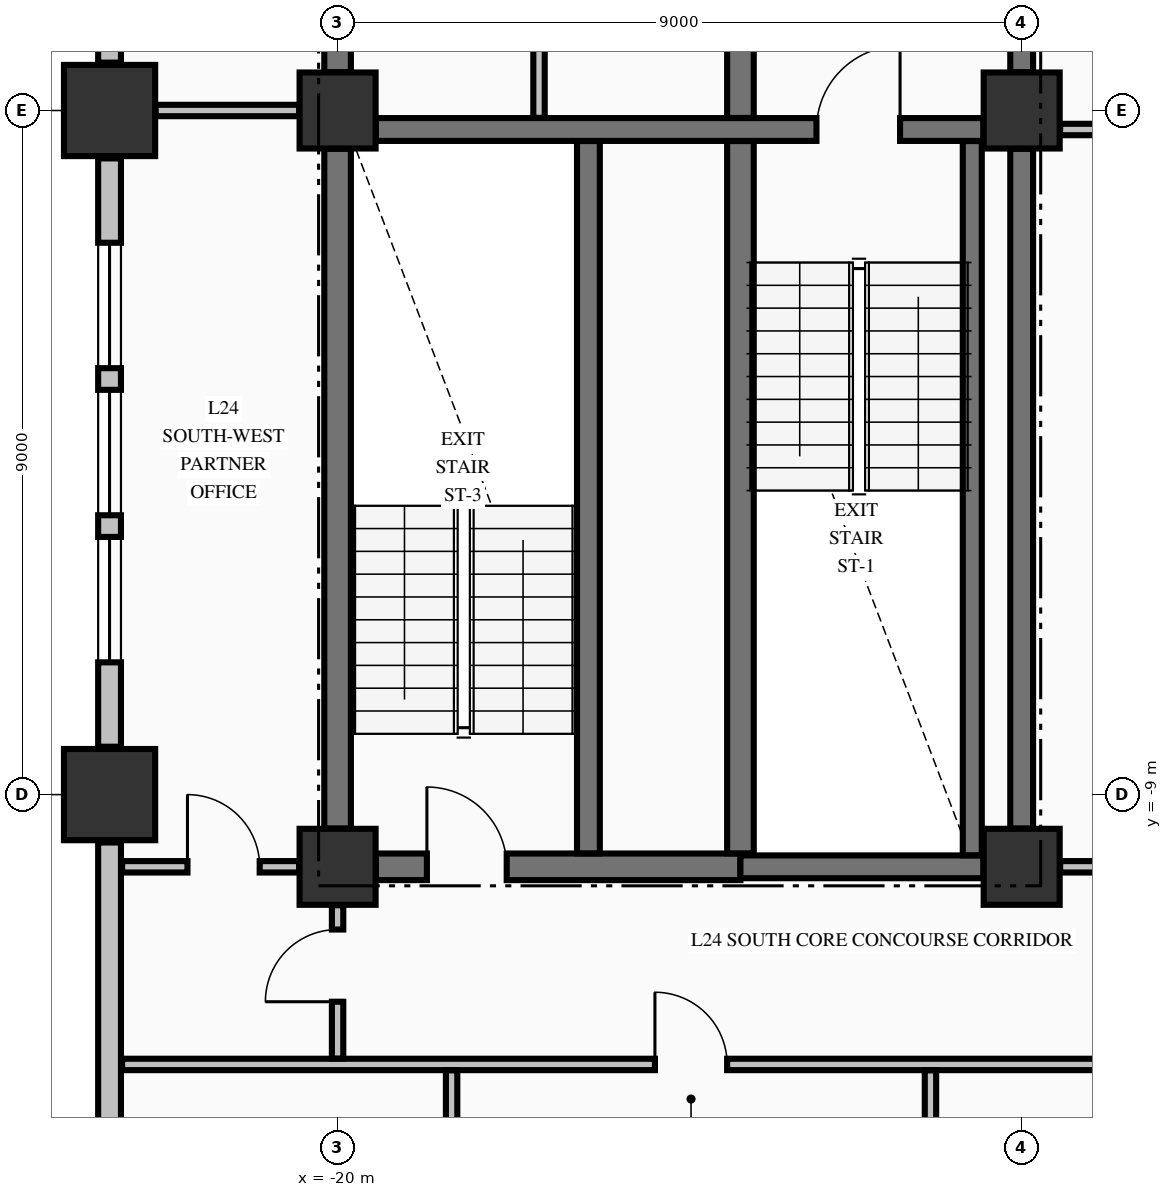
"""IFC4 building model, lengths in metres.
Left out: names, types, materials, properties, quantities, classifications, styles, units other than length and angle.
Written with IfcOpenShell. Run it as: python <this file> out.ifc"""

import sys

from ifc_helpers import new_model, si_unit, direction, frame, frame_2d, origin, origin_2d, place, context, subcontext, project, spatial, rectangle, extrude, element, fill, save


model = new_model("IFC4")
c1 = context("Model", 3, precision=1e-05, world=origin(), true_north=direction((0.0, 1.0)))
c2 = subcontext(c1, "Body", "Model", "MODEL_VIEW")
j1 = project(units=[si_unit("LENGTHUNIT", "METRE"), si_unit("PLANEANGLEUNIT", "RADIAN")], contexts=[c1])
p1 = place(None, origin())
s1 = spatial("IfcSite", under=j1, at=p1, CompositionType="ELEMENT")
p2 = place(p1, origin())
s2 = spatial("IfcBuilding", under=s1, at=p2, CompositionType="ELEMENT")
p3 = place(p2, frame((0.0, 0.0, 98.5)))
s3 = spatial("IfcBuildingStorey", under=s2, at=p3, CompositionType="ELEMENT", Elevation=98.5)
for number, where, z_axis, x_axis in (
    (1, (-23.0, -9.0, -0.275), (0.0, 0.0, 1.0), (1.0, 0.0, 0.0)),
    (2, (-23.0, 0.0, -0.275), (0.0, 0.0, 1.0), (1.0, 0.0, 0.0)),
):
    element("IfcColumn", number, at=place(p3, frame(where, z_axis=z_axis, x_axis=x_axis)), inside=s3, PredefinedType="COLUMN", context=c2, shape_type="SweptSolid", body=[
        extrude(rectangle(XDim=1.2, YDim=1.2, at=origin_2d()), origin(), (0.0, 0.0, 1.0), 3.595),
    ])
for number, where, z_axis, x_axis in (
    (3, (-20.0, -9.95, -0.275), (0.0, 0.0, 1.0), (1.0, 0.0, 0.0)),
    (4, (-11.0, -9.95, -0.275), (0.0, 0.0, 1.0), (1.0, 0.0, 0.0)),
    (5, (-11.0, 0.0, -0.275), (0.0, 0.0, 1.0), (1.0, 0.0, 0.0)),
    (6, (-20.0, 0.0, -0.275), (0.0, 0.0, 1.0), (1.0, 0.0, 0.0)),
):
    element("IfcColumn", number, at=place(p3, frame(where, z_axis=z_axis, x_axis=x_axis)), inside=s3, PredefinedType="COLUMN", context=c2, shape_type="SweptSolid", body=[
        extrude(rectangle(XDim=1.0, YDim=1.0, at=origin_2d()), origin(), (0.0, 0.0, 1.0), 3.595),
    ])
p4 = place(p3, frame((-23.0, -9.63, 0.0), z_axis=(0.0, 0.0, 1.0), x_axis=(0.0, -1.0, 0.0)))
e7 = element("IfcWall", 7, at=p4, inside=s3, PredefinedType="STANDARD", context=c2, shape_type="SweptSolid", body=[
    extrude(rectangle(XDim=10.74, YDim=0.3, at=frame_2d((5.37, 0.0))), origin(), (0.0, 0.0, 1.0), 2.712),
])
p5 = place(p3, frame((-23.0, -0.63, 0.0), z_axis=(0.0, 0.0, 1.0), x_axis=(0.0, -1.0, 0.0)))
e8 = element("IfcWall", 8, at=p5, inside=s3, PredefinedType="STANDARD", context=c2, shape_type="SweptSolid", body=[
    extrude(rectangle(XDim=7.74, YDim=0.3, at=frame_2d((3.87, 0.0))), origin(), (0.0, 0.0, 1.0), 2.712),
])
p6 = place(p5, frame((1.11, 0.0, 0.8)))
e9 = element("IfcOpeningElement", 9, at=p6, cuts=e8, PredefinedType="OPENING", context=c2, shape_type="SweptSolid", body=[
    extrude(rectangle(XDim=1.65, YDim=1.7, at=frame_2d((0.825, 0.85))), frame((0.0, 0.16, 0.0), z_axis=(0.0, -1.0, 0.0), x_axis=(1.0, 0.0, 0.0)), (0.0, 0.0, 1.0), 0.32),
])
p7 = place(p5, frame((3.045, 0.0, 0.8)))
e10 = element("IfcOpeningElement", 10, at=p7, cuts=e8, PredefinedType="OPENING", context=c2, shape_type="SweptSolid", body=[
    extrude(rectangle(XDim=1.65, YDim=1.7, at=frame_2d((0.825, 0.85))), frame((0.0, 0.16, 0.0), z_axis=(0.0, -1.0, 0.0), x_axis=(1.0, 0.0, 0.0)), (0.0, 0.0, 1.0), 0.32),
])
p8 = place(p5, frame((4.98, 0.0, 0.8)))
e11 = element("IfcOpeningElement", 11, at=p8, cuts=e8, PredefinedType="OPENING", context=c2, shape_type="SweptSolid", body=[
    extrude(rectangle(XDim=1.65, YDim=1.7, at=frame_2d((0.825, 0.85))), frame((0.0, 0.16, 0.0), z_axis=(0.0, -1.0, 0.0), x_axis=(1.0, 0.0, 0.0)), (0.0, 0.0, 1.0), 0.32),
])
p9 = place(p3, frame((-23.0, 8.37, 0.0), z_axis=(0.0, 0.0, 1.0), x_axis=(0.0, -1.0, 0.0)))
e12 = element("IfcWall", 12, at=p9, inside=s3, PredefinedType="STANDARD", context=c2, shape_type="SweptSolid", body=[
    extrude(rectangle(XDim=7.74, YDim=0.3, at=frame_2d((3.87, 0.0))), origin(), (0.0, 0.0, 1.0), 2.712),
])
p10 = place(p9, frame((1.11, 0.0, 0.8)))
e13 = element("IfcOpeningElement", 13, at=p10, cuts=e12, PredefinedType="OPENING", context=c2, shape_type="SweptSolid", body=[
    extrude(rectangle(XDim=1.65, YDim=1.7, at=frame_2d((0.825, 0.85))), frame((0.0, 0.16, 0.0), z_axis=(0.0, -1.0, 0.0), x_axis=(1.0, 0.0, 0.0)), (0.0, 0.0, 1.0), 0.32),
])
p11 = place(p9, frame((3.045, 0.0, 0.8)))
e14 = element("IfcOpeningElement", 14, at=p11, cuts=e12, PredefinedType="OPENING", context=c2, shape_type="SweptSolid", body=[
    extrude(rectangle(XDim=1.65, YDim=1.7, at=frame_2d((0.825, 0.85))), frame((0.0, 0.16, 0.0), z_axis=(0.0, -1.0, 0.0), x_axis=(1.0, 0.0, 0.0)), (0.0, 0.0, 1.0), 0.32),
])
p12 = place(p9, frame((4.98, 0.0, 0.8)))
e15 = element("IfcOpeningElement", 15, at=p12, cuts=e12, PredefinedType="OPENING", context=c2, shape_type="SweptSolid", body=[
    extrude(rectangle(XDim=1.65, YDim=1.7, at=frame_2d((0.825, 0.85))), frame((0.0, 0.16, 0.0), z_axis=(0.0, -1.0, 0.0), x_axis=(1.0, 0.0, 0.0)), (0.0, 0.0, 1.0), 0.32),
])
p13 = place(p3, frame((-19.496, -9.95, 0.0), z_axis=(0.0, 0.0, 1.0), x_axis=(1.0, 0.0, 0.0)))
e16 = element("IfcWall", 16, at=p13, inside=s3, PredefinedType="SHEAR", context=c2, shape_type="SweptSolid", body=[
    extrude(rectangle(XDim=4.796, YDim=0.35, at=frame_2d((2.398, 0.0))), origin(), (0.0, 0.0, 1.0), 3.32),
])
p14 = place(p13, frame((0.671, 0.0, 0.0)))
e17 = element("IfcOpeningElement", 17, at=p14, cuts=e16, PredefinedType="OPENING", context=c2, shape_type="SweptSolid", body=[
    extrude(rectangle(XDim=1.05, YDim=2.15, at=frame_2d((0.525, 1.075))), frame((0.0, 0.185, 0.0), z_axis=(0.0, -1.0, 0.0), x_axis=(1.0, 0.0, 0.0)), (0.0, 0.0, 1.0), 0.37),
])
p15 = place(p3, frame((-14.7, -9.95, 0.0), z_axis=(0.0, 0.0, 1.0), x_axis=(1.0, 0.0, 0.0)))
e18 = element("IfcWall", 18, at=p15, inside=s3, PredefinedType="SHEAR", context=c2, shape_type="SweptSolid", body=[
    extrude(rectangle(XDim=3.196, YDim=0.3, at=frame_2d((1.598, 0.0))), origin(), (0.0, 0.0, 1.0), 3.32),
])
p16 = place(p3, frame((-19.496, -0.25, 0.0), z_axis=(0.0, 0.0, 1.0), x_axis=(1.0, 0.0, 0.0)))
e19 = element("IfcWall", 19, at=p16, inside=s3, PredefinedType="SHEAR", context=c2, shape_type="SweptSolid", body=[
    extrude(rectangle(XDim=7.992, YDim=0.3, at=frame_2d((3.996, 0.0))), origin(), (0.0, 0.0, 1.0), 3.32),
])
p17 = place(p16, frame((5.796, 0.0, 0.0)))
e20 = element("IfcOpeningElement", 20, at=p17, cuts=e19, PredefinedType="OPENING", context=c2, shape_type="SweptSolid", body=[
    extrude(rectangle(XDim=1.1, YDim=2.15, at=frame_2d((0.55, 1.075))), frame((0.0, 0.16, 0.0), z_axis=(0.0, -1.0, 0.0), x_axis=(1.0, 0.0, 0.0)), (0.0, 0.0, 1.0), 0.32),
])
p18 = place(p3, frame((-22.835, -12.55, 0.0), z_axis=(0.0, 0.0, 1.0), x_axis=(1.0, 0.0, 0.0)))
e21 = element("IfcWall", 21, at=p18, inside=s3, PredefinedType="PARTITIONING", context=c2, shape_type="SweptSolid", body=[
    extrude(rectangle(XDim=50.67, YDim=0.15, at=frame_2d((25.335, 0.0))), origin(), (0.0, 0.0, 1.0), 3.32),
])
p19 = place(p18, frame((7.01, 0.0, 0.0)))
e22 = element("IfcOpeningElement", 22, at=p19, cuts=e21, PredefinedType="OPENING", context=c2, shape_type="SweptSolid", body=[
    extrude(rectangle(XDim=0.95, YDim=2.15, at=frame_2d((0.475, 1.075))), frame((0.0, 0.085, 0.0), z_axis=(0.0, -1.0, 0.0), x_axis=(1.0, 0.0, 0.0)), (0.0, 0.0, 1.0), 0.17),
])
p20 = place(p18, frame((14.91, 0.0, 0.0)))
e23 = element("IfcOpeningElement", 23, at=p20, cuts=e21, PredefinedType="OPENING", context=c2, shape_type="SweptSolid", body=[
    extrude(rectangle(XDim=1.05, YDim=2.15, at=frame_2d((0.525, 1.075))), frame((0.0, 0.085, 0.0), z_axis=(0.0, -1.0, 0.0), x_axis=(1.0, 0.0, 0.0)), (0.0, 0.0, 1.0), 0.17),
])
p21 = place(p18, frame((24.71, 0.0, 0.0)))
e24 = element("IfcOpeningElement", 24, at=p21, cuts=e21, PredefinedType="OPENING", context=c2, shape_type="SweptSolid", body=[
    extrude(rectangle(XDim=1.05, YDim=2.15, at=frame_2d((0.525, 1.075))), frame((0.0, 0.085, 0.0), z_axis=(0.0, -1.0, 0.0), x_axis=(1.0, 0.0, 0.0)), (0.0, 0.0, 1.0), 0.17),
])
p22 = place(p18, frame((35.91, 0.0, 0.0)))
e25 = element("IfcOpeningElement", 25, at=p22, cuts=e21, PredefinedType="OPENING", context=c2, shape_type="SweptSolid", body=[
    extrude(rectangle(XDim=1.05, YDim=2.15, at=frame_2d((0.525, 1.075))), frame((0.0, 0.085, 0.0), z_axis=(0.0, -1.0, 0.0), x_axis=(1.0, 0.0, 0.0)), (0.0, 0.0, 1.0), 0.17),
])
p23 = place(p3, frame((-22.835, -9.95, 0.0), z_axis=(0.0, 0.0, 1.0), x_axis=(1.0, 0.0, 0.0)))
e26 = element("IfcWall", 26, at=p23, inside=s3, PredefinedType="PARTITIONING", context=c2, shape_type="SweptSolid", body=[
    extrude(rectangle(XDim=2.329, YDim=0.15, at=frame_2d((1.165, 0.0))), origin(), (0.0, 0.0, 1.0), 3.32),
])
p24 = place(p23, frame((0.86, 0.0, 0.0)))
e27 = element("IfcOpeningElement", 27, at=p24, cuts=e26, PredefinedType="OPENING", context=c2, shape_type="SweptSolid", body=[
    extrude(rectangle(XDim=0.95, YDim=2.15, at=frame_2d((0.475, 1.075))), frame((0.0, 0.085, 0.0), z_axis=(0.0, -1.0, 0.0), x_axis=(1.0, 0.0, 0.0)), (0.0, 0.0, 1.0), 0.17),
])
p25 = place(p3, frame((-10.494, -9.95, 0.0), z_axis=(0.0, 0.0, 1.0), x_axis=(1.0, 0.0, 0.0)))
e28 = element("IfcWall", 28, at=p25, inside=s3, PredefinedType="PARTITIONING", context=c2, shape_type="SweptSolid", body=[
    extrude(rectangle(XDim=20.988, YDim=0.15, at=frame_2d((10.494, 0.0))), origin(), (0.0, 0.0, 1.0), 3.32),
])
p26 = place(p25, frame((8.194, 0.0, 0.0)))
e29 = element("IfcOpeningElement", 29, at=p26, cuts=e28, PredefinedType="OPENING", context=c2, shape_type="SweptSolid", body=[
    extrude(rectangle(XDim=1.1, YDim=2.15, at=frame_2d((0.55, 1.075))), frame((0.0, 0.085, 0.0), z_axis=(0.0, -1.0, 0.0), x_axis=(1.0, 0.0, 0.0)), (0.0, 0.0, 1.0), 0.17),
])
p27 = place(p25, frame((13.619, 0.0, 0.0)))
e30 = element("IfcOpeningElement", 30, at=p27, cuts=e28, PredefinedType="OPENING", context=c2, shape_type="SweptSolid", body=[
    extrude(rectangle(XDim=0.95, YDim=2.15, at=frame_2d((0.475, 1.075))), frame((0.0, 0.085, 0.0), z_axis=(0.0, -1.0, 0.0), x_axis=(1.0, 0.0, 0.0)), (0.0, 0.0, 1.0), 0.17),
])
p28 = place(p25, frame((17.844, 0.0, 0.0)))
e31 = element("IfcOpeningElement", 31, at=p28, cuts=e28, PredefinedType="OPENING", context=c2, shape_type="SweptSolid", body=[
    extrude(rectangle(XDim=0.9, YDim=2.15, at=frame_2d((0.45, 1.075))), frame((0.0, 0.085, 0.0), z_axis=(0.0, -1.0, 0.0), x_axis=(1.0, 0.0, 0.0)), (0.0, 0.0, 1.0), 0.17),
])
p29 = place(p3, frame((-10.494, -0.25, 0.0), z_axis=(0.0, 0.0, 1.0), x_axis=(1.0, 0.0, 0.0)))
e32 = element("IfcWall", 32, at=p29, inside=s3, PredefinedType="PARTITIONING", context=c2, shape_type="SweptSolid", body=[
    extrude(rectangle(XDim=20.988, YDim=0.15, at=frame_2d((10.494, 0.0))), origin(), (0.0, 0.0, 1.0), 3.32),
])
p30 = place(p29, frame((8.194, 0.0, 0.0)))
e33 = element("IfcOpeningElement", 33, at=p30, cuts=e32, PredefinedType="OPENING", context=c2, shape_type="SweptSolid", body=[
    extrude(rectangle(XDim=1.1, YDim=2.15, at=frame_2d((0.55, 1.075))), frame((0.0, 0.085, 0.0), z_axis=(0.0, -1.0, 0.0), x_axis=(1.0, 0.0, 0.0)), (0.0, 0.0, 1.0), 0.17),
])
p31 = place(p29, frame((3.049, 0.0, 0.0)))
e34 = element("IfcOpeningElement", 34, at=p31, cuts=e32, PredefinedType="OPENING", context=c2, shape_type="SweptSolid", body=[
    extrude(rectangle(XDim=1.05, YDim=2.15, at=frame_2d((0.525, 1.075))), frame((0.0, 0.085, 0.0), z_axis=(0.0, -1.0, 0.0), x_axis=(1.0, 0.0, 0.0)), (0.0, 0.0, 1.0), 0.17),
])
p32 = place(p29, frame((15.189, 0.0, 0.0)))
e35 = element("IfcOpeningElement", 35, at=p32, cuts=e32, PredefinedType="OPENING", context=c2, shape_type="SweptSolid", body=[
    extrude(rectangle(XDim=0.95, YDim=2.15, at=frame_2d((0.475, 1.075))), frame((0.0, 0.085, 0.0), z_axis=(0.0, -1.0, 0.0), x_axis=(1.0, 0.0, 0.0)), (0.0, 0.0, 1.0), 0.17),
])
p33 = place(p3, frame((-22.394, 0.0, 0.0), z_axis=(0.0, 0.0, 1.0), x_axis=(1.0, 0.0, 0.0)))
e36 = element("IfcWall", 36, at=p33, inside=s3, PredefinedType="PARTITIONING", context=c2, shape_type="SweptSolid", body=[
    extrude(rectangle(XDim=1.888, YDim=0.15, at=frame_2d((0.944, 0.0))), origin(), (0.0, 0.0, 1.0), 2.81),
])
p34 = place(p3, frame((-20.0, -9.446, 0.0), z_axis=(0.0, 0.0, 1.0), x_axis=(0.0, 1.0, 0.0)))
e37 = element("IfcWall", 37, at=p34, inside=s3, PredefinedType="SHEAR", context=c2, shape_type="SweptSolid", body=[
    extrude(rectangle(XDim=8.942, YDim=0.35, at=frame_2d((4.471, 0.0))), origin(), (0.0, 0.0, 1.0), 3.32),
])
p35 = place(p3, frame((-20.0, 0.504, 0.0), z_axis=(0.0, 0.0, 1.0), x_axis=(0.0, 1.0, 0.0)))
e38 = element("IfcWall", 38, at=p35, inside=s3, PredefinedType="SHEAR", context=c2, shape_type="SweptSolid", body=[
    extrude(rectangle(XDim=9.492, YDim=0.35, at=frame_2d((4.746, 0.0))), origin(), (0.0, 0.0, 1.0), 3.32),
])
p36 = place(p3, frame((-16.7, -9.773, 0.0), z_axis=(0.0, 0.0, 1.0), x_axis=(0.0, 1.0, 0.0)))
e39 = element("IfcWall", 39, at=p36, inside=s3, PredefinedType="SHEAR", context=c2, shape_type="SweptSolid", body=[
    extrude(rectangle(XDim=9.371, YDim=0.3, at=frame_2d((4.686, 0.0))), origin(), (0.0, 0.0, 1.0), 3.32),
])
p37 = place(p3, frame((-14.7, -9.773, 0.0), z_axis=(0.0, 0.0, 1.0), x_axis=(0.0, 1.0, 0.0)))
e40 = element("IfcWall", 40, at=p37, inside=s3, PredefinedType="SHEAR", context=c2, shape_type="SweptSolid", body=[
    extrude(rectangle(XDim=9.371, YDim=0.35, at=frame_2d((4.686, 0.0))), origin(), (0.0, 0.0, 1.0), 3.32),
])
p38 = place(p3, frame((-14.7, -0.098, 0.0), z_axis=(0.0, 0.0, 1.0), x_axis=(0.0, 1.0, 0.0)))
e41 = element("IfcWall", 41, at=p38, inside=s3, PredefinedType="SHEAR", context=c2, shape_type="SweptSolid", body=[
    extrude(rectangle(XDim=2.846, YDim=0.35, at=frame_2d((1.423, 0.0))), origin(), (0.0, 0.0, 1.0), 3.32),
])
p39 = place(p3, frame((-11.65, -9.798, 0.0), z_axis=(0.0, 0.0, 1.0), x_axis=(0.0, 1.0, 0.0)))
e42 = element("IfcWall", 42, at=p39, inside=s3, PredefinedType="SOLIDWALL", context=c2, shape_type="SweptSolid", body=[
    extrude(rectangle(XDim=9.396, YDim=0.25, at=frame_2d((4.698, 0.0))), origin(), (0.0, 0.0, 1.0), 3.32),
])
p40 = place(p3, frame((-11.0, -9.446, 0.0), z_axis=(0.0, 0.0, 1.0), x_axis=(0.0, 1.0, 0.0)))
e43 = element("IfcWall", 43, at=p40, inside=s3, PredefinedType="SHEAR", context=c2, shape_type="SweptSolid", body=[
    extrude(rectangle(XDim=8.942, YDim=0.3, at=frame_2d((4.471, 0.0))), origin(), (0.0, 0.0, 1.0), 3.32),
])
p41 = place(p3, frame((-11.0, 0.504, 0.0), z_axis=(0.0, 0.0, 1.0), x_axis=(0.0, 1.0, 0.0)))
e44 = element("IfcWall", 44, at=p41, inside=s3, PredefinedType="SHEAR", context=c2, shape_type="SweptSolid", body=[
    extrude(rectangle(XDim=2.244, YDim=0.3, at=frame_2d((1.122, 0.0))), origin(), (0.0, 0.0, 1.0), 3.32),
])
p42 = place(p41, frame((0.596, 0.0, 0.0)))
e45 = element("IfcOpeningElement", 45, at=p42, cuts=e44, PredefinedType="OPENING", context=c2, shape_type="SweptSolid", body=[
    extrude(rectangle(XDim=1.1, YDim=2.15, at=frame_2d((0.55, 1.075))), frame((0.0, 0.16, 0.0), z_axis=(0.0, -1.0, 0.0), x_axis=(1.0, 0.0, 0.0)), (0.0, 0.0, 1.0), 0.32),
])
p43 = place(p3, frame((-20.0, -12.472, 0.0), z_axis=(0.0, 0.0, 1.0), x_axis=(0.0, 1.0, 0.0)))
e46 = element("IfcWall", 46, at=p43, inside=s3, PredefinedType="PARTITIONING", context=c2, shape_type="SweptSolid", body=[
    extrude(rectangle(XDim=2.016, YDim=0.15, at=frame_2d((1.008, 0.0))), origin(), (0.0, 0.0, 1.0), 2.81),
])
p44 = place(p43, frame((0.747, 0.0, 0.0)))
e47 = element("IfcOpeningElement", 47, at=p44, cuts=e46, PredefinedType="OPENING", context=c2, shape_type="SweptSolid", body=[
    extrude(rectangle(XDim=0.95, YDim=2.15, at=frame_2d((0.475, 1.075))), frame((0.0, 0.085, 0.0), z_axis=(0.0, -1.0, 0.0), x_axis=(1.0, 0.0, 0.0)), (0.0, 0.0, 1.0), 0.17),
])
p45 = place(p3, frame((-18.5, -20.394, 0.0), z_axis=(0.0, 0.0, 1.0), x_axis=(0.0, 1.0, 0.0)))
e48 = element("IfcWall", 48, at=p45, inside=s3, PredefinedType="PARTITIONING", context=c2, shape_type="SweptSolid", body=[
    extrude(rectangle(XDim=7.766, YDim=0.15, at=frame_2d((3.883, 0.0))), origin(), (0.0, 0.0, 1.0), 3.32),
])
p46 = place(p3, frame((-17.35, -0.097, 0.0), z_axis=(0.0, 0.0, 1.0), x_axis=(0.0, 1.0, 0.0)))
e49 = element("IfcWall", 49, at=p46, inside=s3, PredefinedType="PARTITIONING", context=c2, shape_type="SweptSolid", body=[
    extrude(rectangle(XDim=5.119, YDim=0.15, at=frame_2d((2.56, 0.0))), origin(), (0.0, 0.0, 1.0), 3.32),
])
p47 = place(p3, frame((-12.2, -25.335, 0.0), z_axis=(0.0, 0.0, 1.0), x_axis=(0.0, 1.0, 0.0)))
e50 = element("IfcWall", 50, at=p47, inside=s3, PredefinedType="PARTITIONING", context=c2, shape_type="SweptSolid", body=[
    extrude(rectangle(XDim=12.707, YDim=0.15, at=frame_2d((6.354, 0.0))), origin(), (0.0, 0.0, 1.0), 3.32),
])
p48 = place(p6, origin())
e51 = element("IfcWindow", 51, at=p48, inside=s3, PartitioningType="SINGLE_PANEL", PredefinedType="WINDOW", context=c2, shape_type="SweptSolid", body=[
    extrude(rectangle(XDim=1.65, YDim=1.7, at=frame_2d((0.825, 0.85))), frame((0.0, 0.03, 0.0), z_axis=(0.0, -1.0, 0.0), x_axis=(1.0, 0.0, 0.0)), (0.0, 0.0, 1.0), 0.06),
])
fill(e9, e51)
p49 = place(p7, origin())
e52 = element("IfcWindow", 52, at=p49, inside=s3, PartitioningType="SINGLE_PANEL", PredefinedType="WINDOW", context=c2, shape_type="SweptSolid", body=[
    extrude(rectangle(XDim=1.65, YDim=1.7, at=frame_2d((0.825, 0.85))), frame((0.0, 0.03, 0.0), z_axis=(0.0, -1.0, 0.0), x_axis=(1.0, 0.0, 0.0)), (0.0, 0.0, 1.0), 0.06),
])
fill(e10, e52)
p50 = place(p8, origin())
e53 = element("IfcWindow", 53, at=p50, inside=s3, PartitioningType="SINGLE_PANEL", PredefinedType="WINDOW", context=c2, shape_type="SweptSolid", body=[
    extrude(rectangle(XDim=1.65, YDim=1.7, at=frame_2d((0.825, 0.85))), frame((0.0, 0.03, 0.0), z_axis=(0.0, -1.0, 0.0), x_axis=(1.0, 0.0, 0.0)), (0.0, 0.0, 1.0), 0.06),
])
fill(e11, e53)
p51 = place(p17, origin())
e54 = element("IfcDoor", 54, at=p51, inside=s3, OperationType="SINGLE_SWING_RIGHT", PredefinedType="DOOR", context=c2, shape_type="SweptSolid", body=[
    extrude(rectangle(XDim=1.1, YDim=2.15, at=frame_2d((0.55, 1.075))), frame((0.0, 0.025, 0.0), z_axis=(0.0, -1.0, 0.0), x_axis=(1.0, 0.0, 0.0)), (0.0, 0.0, 1.0), 0.05),
])
fill(e20, e54)
p52 = place(p14, origin())
e55 = element("IfcDoor", 55, at=p52, inside=s3, OperationType="SINGLE_SWING_LEFT", PredefinedType="DOOR", context=c2, shape_type="SweptSolid", body=[
    extrude(rectangle(XDim=1.05, YDim=2.15, at=frame_2d((0.525, 1.075))), frame((0.0, 0.025, 0.0), z_axis=(0.0, -1.0, 0.0), x_axis=(1.0, 0.0, 0.0)), (0.0, 0.0, 1.0), 0.05),
])
fill(e17, e55)
p53 = place(p19, origin())
e56 = element("IfcDoor", 56, at=p53, inside=s3, OperationType="SINGLE_SWING_LEFT", PredefinedType="DOOR", context=c2, shape_type="SweptSolid", body=[
    extrude(rectangle(XDim=0.95, YDim=2.15, at=frame_2d((0.475, 1.075))), frame((0.0, 0.025, 0.0), z_axis=(0.0, -1.0, 0.0), x_axis=(1.0, 0.0, 0.0)), (0.0, 0.0, 1.0), 0.05),
])
fill(e22, e56)
p54 = place(p44, origin())
e57 = element("IfcDoor", 57, at=p54, inside=s3, OperationType="SINGLE_SWING_LEFT", PredefinedType="DOOR", context=c2, shape_type="SweptSolid", body=[
    extrude(rectangle(XDim=0.95, YDim=2.15, at=frame_2d((0.475, 1.075))), frame((0.0, 0.025, 0.0), z_axis=(0.0, -1.0, 0.0), x_axis=(1.0, 0.0, 0.0)), (0.0, 0.0, 1.0), 0.05),
])
fill(e47, e57)
p55 = place(p24, origin())
e58 = element("IfcDoor", 58, at=p55, inside=s3, OperationType="SINGLE_SWING_LEFT", PredefinedType="DOOR", context=c2, shape_type="SweptSolid", body=[
    extrude(rectangle(XDim=0.95, YDim=2.15, at=frame_2d((0.475, 1.075))), frame((0.0, 0.025, 0.0), z_axis=(0.0, -1.0, 0.0), x_axis=(1.0, 0.0, 0.0)), (0.0, 0.0, 1.0), 0.05),
])
fill(e27, e58)
save(model, sys.argv[1])
